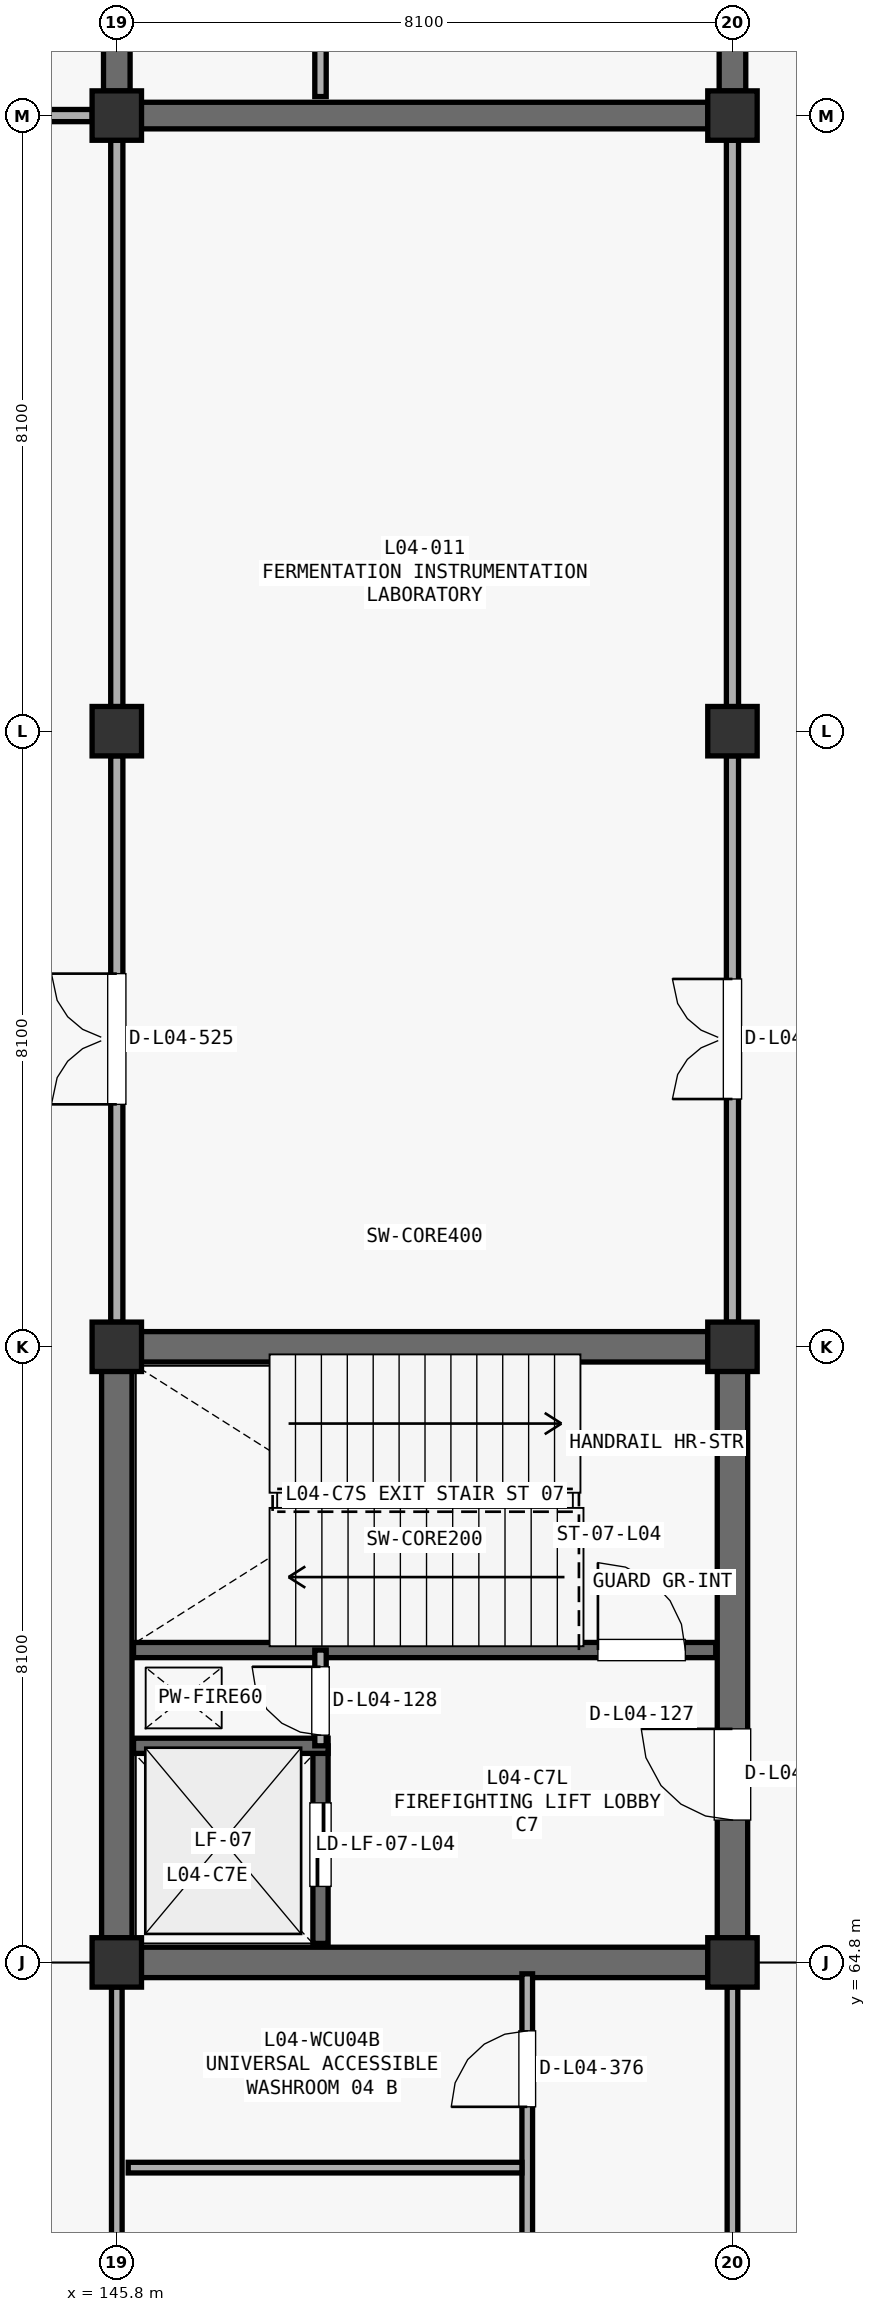
"""IFC4 building model, lengths in metres.
Left out: names, types, materials, properties, quantities, classifications, styles, units other than length and angle.
Written with IfcOpenShell. Run it as: python <this file> out.ifc"""

import sys

from ifc_helpers import new_model, si_unit, direction, frame, frame_2d, origin, origin_2d, place, context, subcontext, project, spatial, rectangle, extrude, element, fill, save


model = new_model("IFC4")
c1 = context("Model", 3, precision=1e-05, world=origin(), true_north=direction((0.0, 1.0)))
c2 = subcontext(c1, "Body", "Model", "MODEL_VIEW")
j1 = project(units=[si_unit("LENGTHUNIT", "METRE"), si_unit("PLANEANGLEUNIT", "RADIAN")], contexts=[c1])
p1 = place(None, origin())
s1 = spatial("IfcSite", under=j1, at=p1, CompositionType="ELEMENT")
p2 = place(p1, origin())
s2 = spatial("IfcBuilding", under=s1, at=p2, CompositionType="ELEMENT")
p3 = place(p2, frame((0.0, 0.0, 18.53)))
s3 = spatial("IfcBuildingStorey", under=s2, at=p3, CompositionType="ELEMENT", Elevation=18.53)
for number, where, z_axis, x_axis in (
    (1, (145.8, 64.8, 0.0), (0.0, 0.0, 1.0), (1.0, 0.0, 0.0)),
    (2, (145.8, 72.9, 0.0), (0.0, 0.0, 1.0), (1.0, 0.0, 0.0)),
    (3, (145.8, 81.0, 0.0), (0.0, 0.0, 1.0), (1.0, 0.0, 0.0)),
    (4, (145.8, 89.1, 0.0), (0.0, 0.0, 1.0), (1.0, 0.0, 0.0)),
    (5, (153.9, 64.8, 0.0), (0.0, 0.0, 1.0), (1.0, 0.0, 0.0)),
    (6, (153.9, 72.9, 0.0), (0.0, 0.0, 1.0), (1.0, 0.0, 0.0)),
    (7, (153.9, 81.0, 0.0), (0.0, 0.0, 1.0), (1.0, 0.0, 0.0)),
    (8, (153.9, 89.1, 0.0), (0.0, 0.0, 1.0), (1.0, 0.0, 0.0)),
):
    element("IfcColumn", number, at=place(p3, frame(where, z_axis=z_axis, x_axis=x_axis)), inside=s3, PredefinedType="COLUMN", context=c2, shape_type="SweptSolid", body=[
        extrude(rectangle(XDim=0.65, YDim=0.65, at=origin_2d()), origin(), (0.0, 0.0, 1.0), 4.42),
    ])
for number, where, z_axis, x_axis in (
    (9, (146.123, 72.9, 0.0), (0.0, 0.0, 1.0), (1.0, 0.0, 0.0)),
    (10, (145.8, 65.123, 0.0), (0.0, 0.0, 1.0), (0.0, 1.0, 0.0)),
):
    element("IfcWall", number, at=place(p3, frame(where, z_axis=z_axis, x_axis=x_axis)), inside=s3, PredefinedType="SHEAR", context=c2, shape_type="SweptSolid", body=[
        extrude(rectangle(XDim=7.454, YDim=0.4, at=frame_2d((3.727, 0.0))), origin(), (0.0, 0.0, 1.0), 4.162),
    ])
p4 = place(p3, frame((153.9, 65.123, 0.0), z_axis=(0.0, 0.0, 1.0), x_axis=(0.0, 1.0, 0.0)))
e11 = element("IfcWall", 11, at=p4, inside=s3, PredefinedType="SHEAR", context=c2, shape_type="SweptSolid", body=[
    extrude(rectangle(XDim=7.454, YDim=0.4, at=frame_2d((3.727, 0.0))), origin(), (0.0, 0.0, 1.0), 4.162),
])
p5 = place(p4, frame((1.55, 0.0, 0.0)))
e12 = element("IfcOpeningElement", 12, at=p5, cuts=e11, PredefinedType="OPENING", context=c2, shape_type="SweptSolid", body=[
    extrude(rectangle(XDim=1.2, YDim=2.2, at=frame_2d((0.6, 1.1))), frame((0.0, 0.21, 0.0), z_axis=(0.0, -1.0, 0.0), x_axis=(1.0, 0.0, 0.0)), (0.0, 0.0, 1.0), 0.42),
])
p6 = place(p3, frame((146.123, 64.8, 0.0), z_axis=(0.0, 0.0, 1.0), x_axis=(1.0, 0.0, 0.0)))
e13 = element("IfcWall", 13, at=p6, inside=s3, PredefinedType="SHEAR", context=c2, shape_type="SweptSolid", body=[
    extrude(rectangle(XDim=7.454, YDim=0.4, at=frame_2d((3.727, 0.0))), origin(), (0.0, 0.0, 1.0), 4.162),
])
p7 = place(p3, frame((146.02, 68.91, 0.0), z_axis=(0.0, 0.0, 1.0), x_axis=(1.0, 0.0, 0.0)))
e14 = element("IfcWall", 14, at=p7, inside=s3, PredefinedType="SHEAR", context=c2, shape_type="SweptSolid", body=[
    extrude(rectangle(XDim=7.66, YDim=0.2, at=frame_2d((3.83, 0.0))), origin(), (0.0, 0.0, 1.0), 4.162),
])
p8 = place(p7, frame((6.11, 0.0, 0.0)))
e15 = element("IfcOpeningElement", 15, at=p8, cuts=e14, PredefinedType="OPENING", context=c2, shape_type="SweptSolid", body=[
    extrude(rectangle(XDim=1.15, YDim=2.2, at=frame_2d((0.575, 1.1))), frame((0.0, 0.11, 0.0), z_axis=(0.0, -1.0, 0.0), x_axis=(1.0, 0.0, 0.0)), (0.0, 0.0, 1.0), 0.22),
])
p9 = place(p3, frame((148.48, 65.05, 0.0), z_axis=(0.0, 0.0, 1.0), x_axis=(0.0, 1.0, 0.0)))
e16 = element("IfcWall", 16, at=p9, inside=s3, PredefinedType="SHEAR", context=c2, shape_type="SweptSolid", body=[
    extrude(rectangle(XDim=2.6, YDim=0.2, at=frame_2d((1.3, 0.0))), origin(), (0.0, 0.0, 1.0), 4.162),
])
p10 = place(p9, frame((0.75, 0.0, 0.0)))
e17 = element("IfcOpeningElement", 17, at=p10, cuts=e16, PredefinedType="OPENING", context=c2, shape_type="SweptSolid", body=[
    extrude(rectangle(XDim=1.1, YDim=2.2, at=frame_2d((0.55, 1.1))), frame((0.0, 0.11, 0.0), z_axis=(0.0, -1.0, 0.0), x_axis=(1.0, 0.0, 0.0)), (0.0, 0.0, 1.0), 0.22),
])
p11 = place(p3, frame((146.02, 67.65, 0.0), z_axis=(0.0, 0.0, 1.0), x_axis=(1.0, 0.0, 0.0)))
e18 = element("IfcWall", 18, at=p11, inside=s3, PredefinedType="SHEAR", context=c2, shape_type="SweptSolid", body=[
    extrude(rectangle(XDim=2.56, YDim=0.2, at=frame_2d((1.28, 0.0))), origin(), (0.0, 0.0, 1.0), 4.162),
])
p12 = place(p3, frame((148.48, 67.65, 0.0), z_axis=(0.0, 0.0, 1.0), x_axis=(0.0, 1.0, 0.0)))
e19 = element("IfcWall", 19, at=p12, inside=s3, PredefinedType="PARTITIONING", context=c2, shape_type="SweptSolid", body=[
    extrude(rectangle(XDim=1.26, YDim=0.15, at=frame_2d((0.63, 0.0))), origin(), (0.0, 0.0, 1.0), 4.162),
])
p13 = place(p12, frame((0.14, 0.0, 0.0)))
e20 = element("IfcOpeningElement", 20, at=p13, cuts=e19, PredefinedType="OPENING", context=c2, shape_type="SweptSolid", body=[
    extrude(rectangle(XDim=0.9, YDim=2.15, at=frame_2d((0.45, 1.075))), frame((0.0, 0.085, 0.0), z_axis=(0.0, -1.0, 0.0), x_axis=(1.0, 0.0, 0.0)), (0.0, 0.0, 1.0), 0.17),
])
p14 = place(p3, frame((145.8, 89.423, 0.0), z_axis=(0.0, 0.0, 1.0), x_axis=(0.0, 1.0, 0.0)))
e21 = element("IfcWall", 21, at=p14, inside=s3, PredefinedType="SHEAR", context=c2, shape_type="SweptSolid", body=[
    extrude(rectangle(XDim=7.454, YDim=0.35, at=frame_2d((3.727, 0.0))), origin(), (0.0, 0.0, 1.0), 4.162),
])
p15 = place(p3, frame((153.9, 89.423, 0.0), z_axis=(0.0, 0.0, 1.0), x_axis=(0.0, 1.0, 0.0)))
e22 = element("IfcWall", 22, at=p15, inside=s3, PredefinedType="SHEAR", context=c2, shape_type="SweptSolid", body=[
    extrude(rectangle(XDim=7.454, YDim=0.35, at=frame_2d((3.727, 0.0))), origin(), (0.0, 0.0, 1.0), 4.162),
])
p16 = place(p15, frame((1.55, 0.0, 0.0)))
e23 = element("IfcOpeningElement", 23, at=p16, cuts=e22, PredefinedType="OPENING", context=c2, shape_type="SweptSolid", body=[
    extrude(rectangle(XDim=1.2, YDim=2.2, at=frame_2d((0.6, 1.1))), frame((0.0, 0.185, 0.0), z_axis=(0.0, -1.0, 0.0), x_axis=(1.0, 0.0, 0.0)), (0.0, 0.0, 1.0), 0.37),
])
p17 = place(p3, frame((146.123, 89.1, 0.0), z_axis=(0.0, 0.0, 1.0), x_axis=(1.0, 0.0, 0.0)))
e24 = element("IfcWall", 24, at=p17, inside=s3, PredefinedType="SHEAR", context=c2, shape_type="SweptSolid", body=[
    extrude(rectangle(XDim=7.454, YDim=0.35, at=frame_2d((3.727, 0.0))), origin(), (0.0, 0.0, 1.0), 4.162),
])
p18 = place(p3, frame((148.48, 89.35, 0.0), z_axis=(0.0, 0.0, 1.0), x_axis=(0.0, 1.0, 0.0)))
e25 = element("IfcWall", 25, at=p18, inside=s3, PredefinedType="PARTITIONING", context=c2, shape_type="SweptSolid", body=[
    extrude(rectangle(XDim=2.6, YDim=0.15, at=frame_2d((1.3, 0.0))), origin(), (0.0, 0.0, 1.0), 4.162),
])
p19 = place(p18, frame((0.8, 0.0, 0.0)))
e26 = element("IfcOpeningElement", 26, at=p19, cuts=e25, PredefinedType="OPENING", context=c2, shape_type="SweptSolid", body=[
    extrude(rectangle(XDim=0.95, YDim=2.15, at=frame_2d((0.475, 1.075))), frame((0.0, 0.085, 0.0), z_axis=(0.0, -1.0, 0.0), x_axis=(1.0, 0.0, 0.0)), (0.0, 0.0, 1.0), 0.17),
])
p20 = place(p3, frame((145.8, 57.023, 0.0), z_axis=(0.0, 0.0, 1.0), x_axis=(0.0, 1.0, 0.0)))
e27 = element("IfcWall", 27, at=p20, inside=s3, PredefinedType="PARTITIONING", context=c2, shape_type="SweptSolid", body=[
    extrude(rectangle(XDim=7.454, YDim=0.14, at=frame_2d((3.727, 0.0))), origin(), (0.0, 0.0, 1.0), 3.31),
])
p21 = place(p3, frame((153.9, 57.023, 0.0), z_axis=(0.0, 0.0, 1.0), x_axis=(0.0, 1.0, 0.0)))
e28 = element("IfcWall", 28, at=p21, inside=s3, PredefinedType="PARTITIONING", context=c2, shape_type="SweptSolid", body=[
    extrude(rectangle(XDim=7.454, YDim=0.14, at=frame_2d((3.727, 0.0))), origin(), (0.0, 0.0, 1.0), 3.41),
])
p22 = place(p21, frame((3.267, 0.0, 0.0)))
e29 = element("IfcOpeningElement", 29, at=p22, cuts=e28, PredefinedType="OPENING", context=c2, shape_type="SweptSolid", body=[
    extrude(rectangle(XDim=0.92, YDim=2.15, at=frame_2d((0.46, 1.075))), frame((0.0, 0.08, 0.0), z_axis=(0.0, -1.0, 0.0), x_axis=(1.0, 0.0, 0.0)), (0.0, 0.0, 1.0), 0.16),
])
p23 = place(p3, frame((151.2, 56.85, 0.0), z_axis=(0.0, 0.0, 1.0), x_axis=(0.0, 1.0, 0.0)))
e30 = element("IfcWall", 30, at=p23, inside=s3, PredefinedType="PARTITIONING", context=c2, shape_type="SweptSolid", body=[
    extrude(rectangle(XDim=7.8, YDim=0.14, at=frame_2d((3.9, 0.0))), origin(), (0.0, 0.0, 1.0), 4.162),
])
p24 = place(p23, frame((0.75, 0.0, 0.0)))
e31 = element("IfcOpeningElement", 31, at=p24, cuts=e30, PredefinedType="OPENING", context=c2, shape_type="SweptSolid", body=[
    extrude(rectangle(XDim=0.92, YDim=2.15, at=frame_2d((0.46, 1.075))), frame((0.0, 0.08, 0.0), z_axis=(0.0, -1.0, 0.0), x_axis=(1.0, 0.0, 0.0)), (0.0, 0.0, 1.0), 0.16),
])
p25 = place(p23, frame((3.44, 0.0, 0.0)))
e32 = element("IfcOpeningElement", 32, at=p25, cuts=e30, PredefinedType="OPENING", context=c2, shape_type="SweptSolid", body=[
    extrude(rectangle(XDim=0.92, YDim=2.15, at=frame_2d((0.46, 1.075))), frame((0.0, 0.08, 0.0), z_axis=(0.0, -1.0, 0.0), x_axis=(1.0, 0.0, 0.0)), (0.0, 0.0, 1.0), 0.16),
])
p26 = place(p23, frame((6.05, 0.0, 0.0)))
e33 = element("IfcOpeningElement", 33, at=p26, cuts=e30, PredefinedType="OPENING", context=c2, shape_type="SweptSolid", body=[
    extrude(rectangle(XDim=1.0, YDim=2.15, at=frame_2d((0.5, 1.075))), frame((0.0, 0.08, 0.0), z_axis=(0.0, -1.0, 0.0), x_axis=(1.0, 0.0, 0.0)), (0.0, 0.0, 1.0), 0.16),
])
p27 = place(p3, frame((145.95, 62.1, 0.0), z_axis=(0.0, 0.0, 1.0), x_axis=(1.0, 0.0, 0.0)))
e34 = element("IfcWall", 34, at=p27, inside=s3, PredefinedType="PARTITIONING", context=c2, shape_type="SweptSolid", body=[
    extrude(rectangle(XDim=5.18, YDim=0.14, at=frame_2d((2.59, 0.0))), origin(), (0.0, 0.0, 1.0), 4.162),
])
p28 = place(p3, frame((145.8, 73.223, 0.0), z_axis=(0.0, 0.0, 1.0), x_axis=(0.0, 1.0, 0.0)))
e35 = element("IfcWall", 35, at=p28, inside=s3, PredefinedType="PARTITIONING", context=c2, shape_type="SweptSolid", body=[
    extrude(rectangle(XDim=7.454, YDim=0.16, at=frame_2d((3.727, 0.0))), origin(), (0.0, 0.0, 1.0), 3.412),
])
p29 = place(p28, frame((2.867, 0.0, 0.0)))
e36 = element("IfcOpeningElement", 36, at=p29, cuts=e35, PredefinedType="OPENING", context=c2, shape_type="SweptSolid", body=[
    extrude(rectangle(XDim=1.72, YDim=2.3, at=frame_2d((0.86, 1.15))), frame((0.0, 0.09, 0.0), z_axis=(0.0, -1.0, 0.0), x_axis=(1.0, 0.0, 0.0)), (0.0, 0.0, 1.0), 0.18),
])
p30 = place(p3, frame((145.8, 81.323, 0.0), z_axis=(0.0, 0.0, 1.0), x_axis=(0.0, 1.0, 0.0)))
e37 = element("IfcWall", 37, at=p30, inside=s3, PredefinedType="PARTITIONING", context=c2, shape_type="SweptSolid", body=[
    extrude(rectangle(XDim=7.454, YDim=0.16, at=frame_2d((3.727, 0.0))), origin(), (0.0, 0.0, 1.0), 3.512),
])
p31 = place(p3, frame((138.023, 89.1, 0.0), z_axis=(0.0, 0.0, 1.0), x_axis=(1.0, 0.0, 0.0)))
e38 = element("IfcWall", 38, at=p31, inside=s3, PredefinedType="PARTITIONING", context=c2, shape_type="SweptSolid", body=[
    extrude(rectangle(XDim=7.454, YDim=0.16, at=frame_2d((3.727, 0.0))), origin(), (0.0, 0.0, 1.0), 3.312),
])
p32 = place(p3, frame((153.9, 73.223, 0.0), z_axis=(0.0, 0.0, 1.0), x_axis=(0.0, 1.0, 0.0)))
e39 = element("IfcWall", 39, at=p32, inside=s3, PredefinedType="PARTITIONING", context=c2, shape_type="SweptSolid", body=[
    extrude(rectangle(XDim=7.454, YDim=0.16, at=frame_2d((3.727, 0.0))), origin(), (0.0, 0.0, 1.0), 3.562),
])
p33 = place(p32, frame((2.937, 0.0, 0.0)))
e40 = element("IfcOpeningElement", 40, at=p33, cuts=e39, PredefinedType="OPENING", context=c2, shape_type="SweptSolid", body=[
    extrude(rectangle(XDim=1.58, YDim=2.2, at=frame_2d((0.79, 1.1))), frame((0.0, 0.09, 0.0), z_axis=(0.0, -1.0, 0.0), x_axis=(1.0, 0.0, 0.0)), (0.0, 0.0, 1.0), 0.18),
])
p34 = place(p3, frame((153.9, 81.323, 0.0), z_axis=(0.0, 0.0, 1.0), x_axis=(0.0, 1.0, 0.0)))
e41 = element("IfcWall", 41, at=p34, inside=s3, PredefinedType="PARTITIONING", context=c2, shape_type="SweptSolid", body=[
    extrude(rectangle(XDim=7.454, YDim=0.16, at=frame_2d((3.727, 0.0))), origin(), (0.0, 0.0, 1.0), 3.312),
])
p35 = place(p5, origin())
e42 = element("IfcDoor", 42, at=p35, inside=s3, OperationType="SINGLE_SWING_RIGHT", PredefinedType="DOOR", context=c2, shape_type="SweptSolid", body=[
    extrude(rectangle(XDim=1.2, YDim=2.2, at=frame_2d((0.6, 1.1))), frame((0.0, 0.025, 0.0), z_axis=(0.0, -1.0, 0.0), x_axis=(1.0, 0.0, 0.0)), (0.0, 0.0, 1.0), 0.05),
])
fill(e12, e42)
p36 = place(p8, origin())
e43 = element("IfcDoor", 43, at=p36, inside=s3, OperationType="SINGLE_SWING_LEFT", PredefinedType="DOOR", context=c2, shape_type="SweptSolid", body=[
    extrude(rectangle(XDim=1.15, YDim=2.2, at=frame_2d((0.575, 1.1))), frame((0.0, 0.025, 0.0), z_axis=(0.0, -1.0, 0.0), x_axis=(1.0, 0.0, 0.0)), (0.0, 0.0, 1.0), 0.05),
])
fill(e15, e43)
p37 = place(p10, origin())
e44 = element("IfcDoor", 44, at=p37, inside=s3, OperationType="SLIDING_TO_LEFT", PredefinedType="DOOR", context=c2, shape_type="SweptSolid", body=[
    extrude(rectangle(XDim=1.1, YDim=2.2, at=frame_2d((0.55, 1.1))), frame((0.0, 0.025, 0.0), z_axis=(0.0, -1.0, 0.0), x_axis=(1.0, 0.0, 0.0)), (0.0, 0.0, 1.0), 0.05),
])
fill(e17, e44)
p38 = place(p13, origin())
e45 = element("IfcDoor", 45, at=p38, inside=s3, OperationType="SINGLE_SWING_RIGHT", PredefinedType="DOOR", context=c2, shape_type="SweptSolid", body=[
    extrude(rectangle(XDim=0.9, YDim=2.15, at=frame_2d((0.45, 1.075))), frame((0.0, 0.025, 0.0), z_axis=(0.0, -1.0, 0.0), x_axis=(1.0, 0.0, 0.0)), (0.0, 0.0, 1.0), 0.05),
])
fill(e20, e45)
p39 = place(p26, origin())
e46 = element("IfcDoor", 46, at=p39, inside=s3, OperationType="SINGLE_SWING_LEFT", PredefinedType="DOOR", context=c2, shape_type="SweptSolid", body=[
    extrude(rectangle(XDim=1.0, YDim=2.15, at=frame_2d((0.5, 1.075))), frame((0.0, 0.025, 0.0), z_axis=(0.0, -1.0, 0.0), x_axis=(1.0, 0.0, 0.0)), (0.0, 0.0, 1.0), 0.05),
])
fill(e33, e46)
p40 = place(p29, origin())
e47 = element("IfcDoor", 47, at=p40, inside=s3, OperationType="DOUBLE_SWING_LEFT", PredefinedType="DOOR", context=c2, shape_type="SweptSolid", body=[
    extrude(rectangle(XDim=1.72, YDim=2.3, at=frame_2d((0.86, 1.15))), frame((0.0, 0.025, 0.0), z_axis=(0.0, -1.0, 0.0), x_axis=(1.0, 0.0, 0.0)), (0.0, 0.0, 1.0), 0.05),
])
fill(e36, e47)
p41 = place(p33, origin())
e48 = element("IfcDoor", 48, at=p41, inside=s3, OperationType="DOUBLE_SWING_LEFT", PredefinedType="DOOR", context=c2, shape_type="SweptSolid", body=[
    extrude(rectangle(XDim=1.58, YDim=2.2, at=frame_2d((0.79, 1.1))), frame((0.0, 0.025, 0.0), z_axis=(0.0, -1.0, 0.0), x_axis=(1.0, 0.0, 0.0)), (0.0, 0.0, 1.0), 0.05),
])
fill(e40, e48)
save(model, sys.argv[1])
